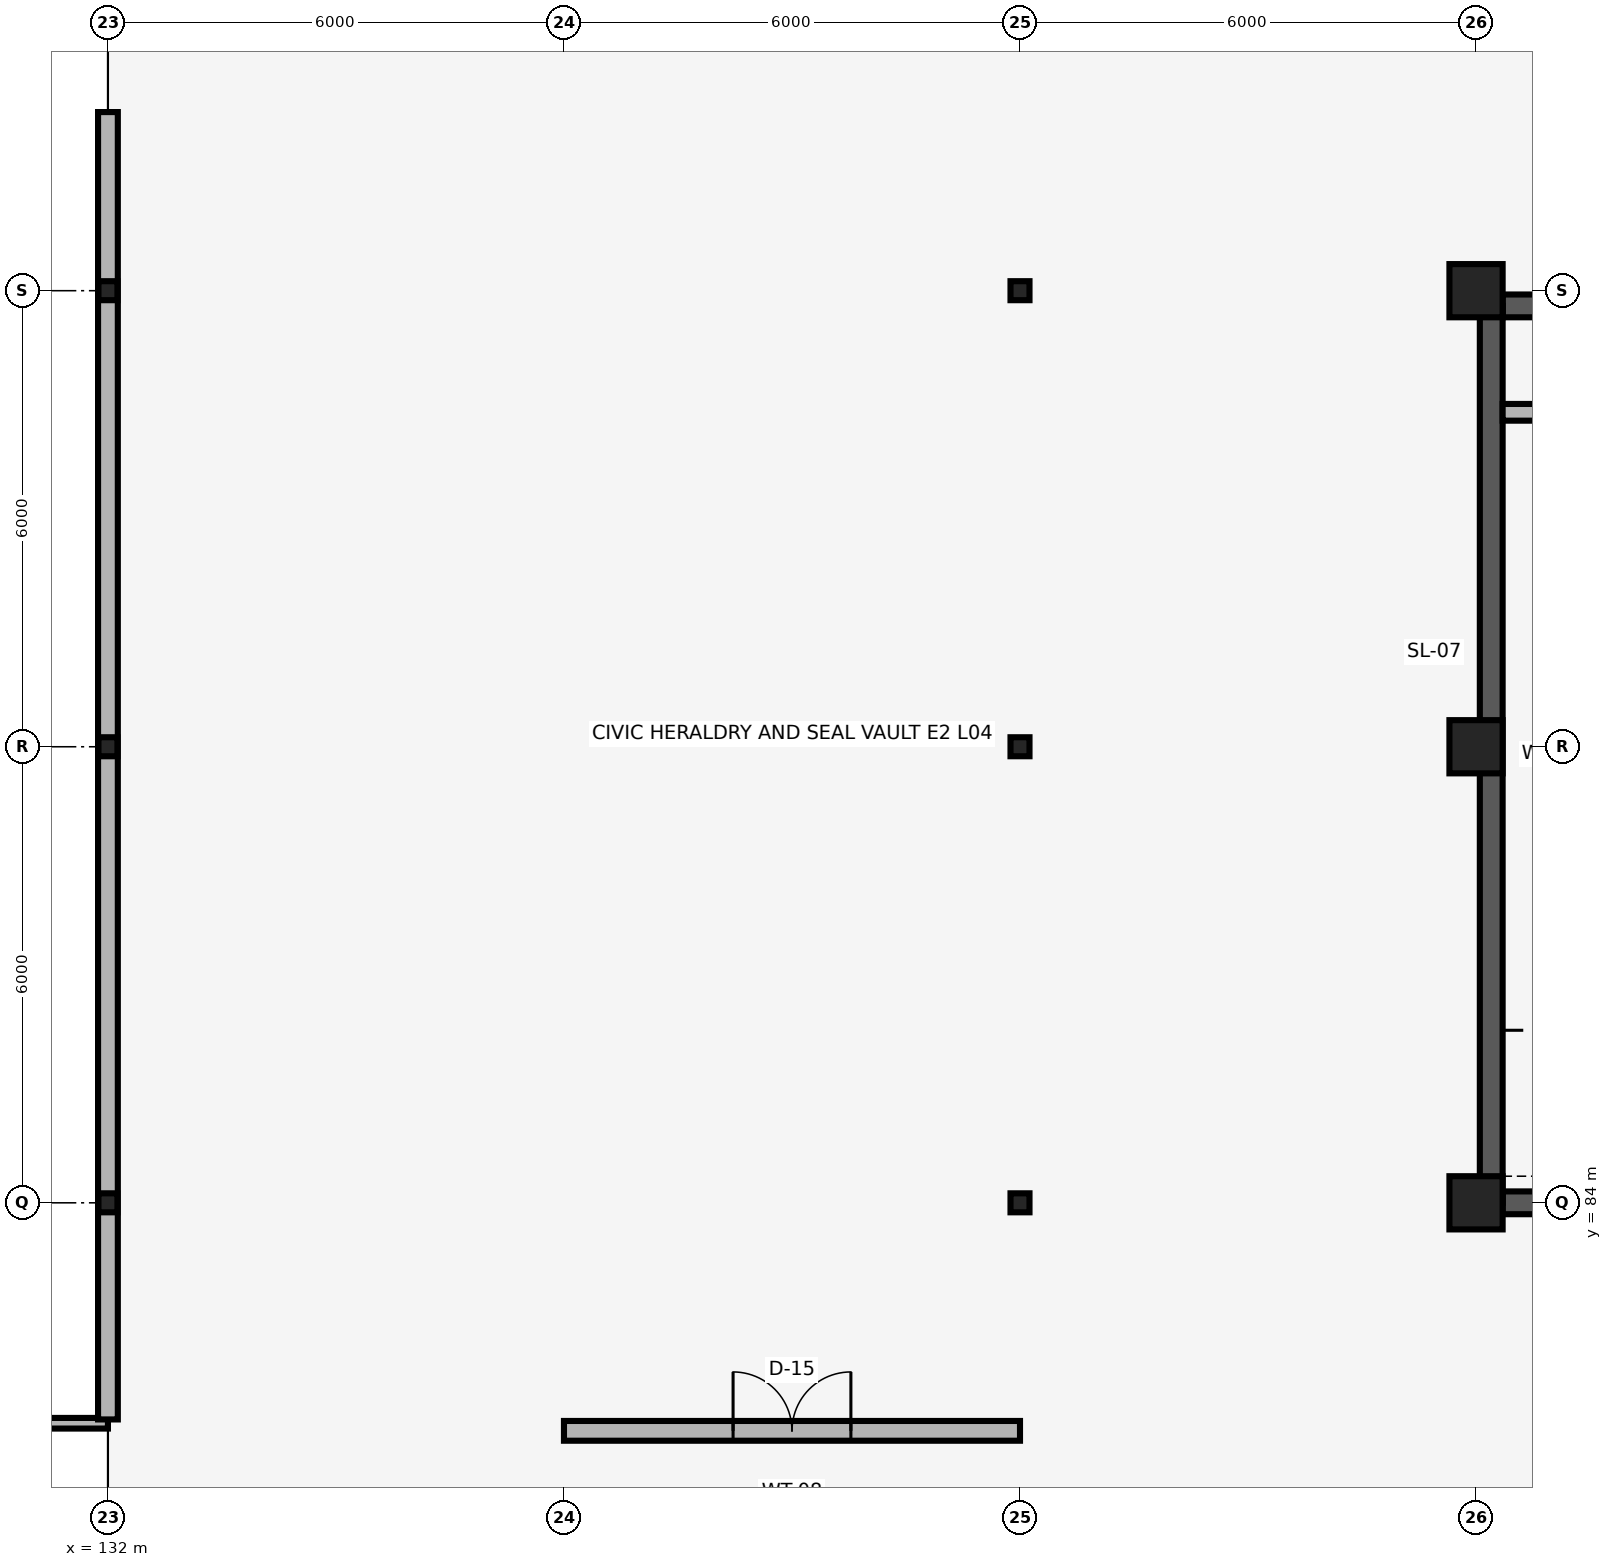
"""IFC4 building model, lengths in metres.
Left out: names, types, materials, properties, quantities, classifications, styles, units other than length and angle.
Written with IfcOpenShell. Run it as: python <this file> out.ifc"""

import sys

from ifc_helpers import new_model, si_unit, direction, frame, frame_2d, origin, origin_2d, place, context, subcontext, project, spatial, rectangle, i_section, extrude, element, fill, save


model = new_model("IFC4")
c1 = context("Model", 3, precision=1e-05, world=origin(), true_north=direction((0.0, 1.0)))
c2 = subcontext(c1, "Body", "Model", "MODEL_VIEW")
j1 = project(units=[si_unit("LENGTHUNIT", "METRE"), si_unit("PLANEANGLEUNIT", "RADIAN")], contexts=[c1])
p1 = place(None, origin())
s1 = spatial("IfcSite", under=j1, at=p1, CompositionType="ELEMENT")
p2 = place(p1, origin())
s2 = spatial("IfcBuilding", under=s1, at=p2, CompositionType="ELEMENT")
p3 = place(p2, frame((0.0, 0.0, 16.5)))
s3 = spatial("IfcBuildingStorey", under=s2, at=p3, CompositionType="ELEMENT", Elevation=16.5)
p4 = place(p3, frame((132.0, 84.0, 0.0), z_axis=(0.0, 0.0, 1.0), x_axis=(1.0, 0.0, 0.0)))
e1 = element("IfcColumn", 1, at=p4, inside=s3, PredefinedType="COLUMN", context=c2, shape_type="SweptSolid", body=[
    extrude(i_section(OverallWidth=0.25, OverallDepth=0.25, WebThickness=0.009, FlangeThickness=0.014, FilletRadius=0.016, at=origin_2d()), origin(), (0.0, 0.0, 1.0), 4.5),
])
p5 = place(p3, frame((144.0, 84.0, 0.0), z_axis=(0.0, 0.0, 1.0), x_axis=(1.0, 0.0, 0.0)))
e2 = element("IfcColumn", 2, at=p5, inside=s3, PredefinedType="COLUMN", context=c2, shape_type="SweptSolid", body=[
    extrude(i_section(OverallWidth=0.25, OverallDepth=0.25, WebThickness=0.009, FlangeThickness=0.014, FilletRadius=0.016, at=origin_2d()), origin(), (0.0, 0.0, 1.0), 4.0),
])
p6 = place(p3, frame((150.0, 84.0, 0.0), z_axis=(0.0, 0.0, 1.0), x_axis=(1.0, 0.0, 0.0)))
e3 = element("IfcColumn", 3, at=p6, inside=s3, PredefinedType="COLUMN", context=c2, shape_type="SweptSolid", body=[
    extrude(rectangle(XDim=0.7, YDim=0.7, at=origin_2d()), origin(), (0.0, 0.0, 1.0), 4.0),
])
p7 = place(p3, frame((132.0, 90.0, 0.0), z_axis=(0.0, 0.0, 1.0), x_axis=(1.0, 0.0, 0.0)))
e4 = element("IfcColumn", 4, at=p7, inside=s3, PredefinedType="COLUMN", context=c2, shape_type="SweptSolid", body=[
    extrude(i_section(OverallWidth=0.25, OverallDepth=0.25, WebThickness=0.009, FlangeThickness=0.014, FilletRadius=0.016, at=origin_2d()), origin(), (0.0, 0.0, 1.0), 4.5),
])
p8 = place(p3, frame((144.0, 90.0, 0.0), z_axis=(0.0, 0.0, 1.0), x_axis=(1.0, 0.0, 0.0)))
e5 = element("IfcColumn", 5, at=p8, inside=s3, PredefinedType="COLUMN", context=c2, shape_type="SweptSolid", body=[
    extrude(i_section(OverallWidth=0.25, OverallDepth=0.25, WebThickness=0.009, FlangeThickness=0.014, FilletRadius=0.016, at=origin_2d()), origin(), (0.0, 0.0, 1.0), 4.0),
])
p9 = place(p3, frame((150.0, 90.0, 0.0), z_axis=(0.0, 0.0, 1.0), x_axis=(1.0, 0.0, 0.0)))
e6 = element("IfcColumn", 6, at=p9, inside=s3, PredefinedType="COLUMN", context=c2, shape_type="SweptSolid", body=[
    extrude(rectangle(XDim=0.7, YDim=0.7, at=origin_2d()), origin(), (0.0, 0.0, 1.0), 4.0),
])
p10 = place(p3, frame((132.0, 96.0, 0.0), z_axis=(0.0, 0.0, 1.0), x_axis=(1.0, 0.0, 0.0)))
e7 = element("IfcColumn", 7, at=p10, inside=s3, PredefinedType="COLUMN", context=c2, shape_type="SweptSolid", body=[
    extrude(i_section(OverallWidth=0.25, OverallDepth=0.25, WebThickness=0.009, FlangeThickness=0.014, FilletRadius=0.016, at=origin_2d()), origin(), (0.0, 0.0, 1.0), 4.5),
])
p11 = place(p3, frame((144.0, 96.0, 0.0), z_axis=(0.0, 0.0, 1.0), x_axis=(1.0, 0.0, 0.0)))
e8 = element("IfcColumn", 8, at=p11, inside=s3, PredefinedType="COLUMN", context=c2, shape_type="SweptSolid", body=[
    extrude(i_section(OverallWidth=0.25, OverallDepth=0.25, WebThickness=0.009, FlangeThickness=0.014, FilletRadius=0.016, at=origin_2d()), origin(), (0.0, 0.0, 1.0), 4.0),
])
p12 = place(p3, frame((150.0, 96.0, 0.0), z_axis=(0.0, 0.0, 1.0), x_axis=(1.0, 0.0, 0.0)))
e9 = element("IfcColumn", 9, at=p12, inside=s3, PredefinedType="COLUMN", context=c2, shape_type="SweptSolid", body=[
    extrude(rectangle(XDim=0.7, YDim=0.7, at=origin_2d()), origin(), (0.0, 0.0, 1.0), 4.0),
])
p13 = place(p3, frame((150.35, 84.0, 0.0), z_axis=(0.0, 0.0, 1.0), x_axis=(1.0, 0.0, 0.0)))
e10 = element("IfcWall", 10, at=p13, inside=s3, PredefinedType="SHEAR", context=c2, shape_type="SweptSolid", body=[
    extrude(rectangle(XDim=5.3, YDim=0.3, at=frame_2d((2.65, 0.0))), origin(), (0.0, 0.0, 1.0), 4.0),
])
p14 = place(p13, frame((1.925, 0.0, 0.0)))
e11 = element("IfcOpeningElement", 11, at=p14, cuts=e10, PredefinedType="OPENING", context=c2, shape_type="SweptSolid", body=[
    extrude(rectangle(XDim=1.45, YDim=2.25, at=frame_2d((0.725, 1.125))), frame((0.0, 0.165, 0.0), z_axis=(0.0, -1.0, 0.0), x_axis=(1.0, 0.0, 0.0)), (0.0, 0.0, 1.0), 0.33),
])
p15 = place(p3, frame((150.35, 95.8, 0.0), z_axis=(0.0, 0.0, 1.0), x_axis=(1.0, 0.0, 0.0)))
e12 = element("IfcWall", 12, at=p15, inside=s3, PredefinedType="SHEAR", context=c2, shape_type="SweptSolid", body=[
    extrude(rectangle(XDim=5.3, YDim=0.3, at=frame_2d((2.65, 0.0))), origin(), (0.0, 0.0, 1.0), 4.0),
])
p16 = place(p3, frame((150.2, 84.0, 0.0), z_axis=(0.0, 0.0, 1.0), x_axis=(0.0, 1.0, 0.0)))
e13 = element("IfcWall", 13, at=p16, inside=s3, PredefinedType="SHEAR", context=c2, shape_type="SweptSolid", body=[
    extrude(rectangle(XDim=11.8, YDim=0.3, at=frame_2d((5.9, 0.0))), origin(), (0.0, 0.0, 1.0), 4.0),
])
p17 = place(p3, frame((150.35, 94.4, 0.0), z_axis=(0.0, 0.0, 1.0), x_axis=(1.0, 0.0, 0.0)))
e14 = element("IfcWall", 14, at=p17, inside=s3, PredefinedType="PARTITIONING", context=c2, shape_type="SweptSolid", body=[
    extrude(rectangle(XDim=1.1, YDim=0.22, at=frame_2d((0.55, 0.0))), origin(), (0.0, 0.0, 1.0), 4.0),
])
p18 = place(p3, frame((120.0, 81.1, 0.0), z_axis=(0.0, 0.0, 1.0), x_axis=(1.0, 0.0, 0.0)))
e15 = element("IfcWall", 15, at=p18, inside=s3, PredefinedType="PARTITIONING", context=c2, shape_type="SweptSolid", body=[
    extrude(rectangle(XDim=12.0, YDim=0.14, at=frame_2d((6.0, 0.0))), origin(), (0.0, 0.0, 1.0), 4.0),
])
p19 = place(p18, frame((4.95, 0.0, 0.0)))
e16 = element("IfcOpeningElement", 16, at=p19, cuts=e15, PredefinedType="OPENING", context=c2, shape_type="SweptSolid", body=[
    extrude(rectangle(XDim=2.1, YDim=2.9, at=frame_2d((1.05, 1.45))), frame((0.0, 0.085, 0.0), z_axis=(0.0, -1.0, 0.0), x_axis=(1.0, 0.0, 0.0)), (0.0, 0.0, 1.0), 0.17),
])
p20 = place(p3, frame((138.0, 81.0, 0.0), z_axis=(0.0, 0.0, 1.0), x_axis=(1.0, 0.0, 0.0)))
e17 = element("IfcWall", 17, at=p20, inside=s3, PredefinedType="PARTITIONING", context=c2, shape_type="SweptSolid", body=[
    extrude(rectangle(XDim=6.0, YDim=0.26, at=frame_2d((3.0, 0.0))), origin(), (0.0, 0.0, 1.0), 4.0),
])
p21 = place(p20, frame((2.225, 0.0, 0.0)))
e18 = element("IfcOpeningElement", 18, at=p21, cuts=e17, PredefinedType="OPENING", context=c2, shape_type="SweptSolid", body=[
    extrude(rectangle(XDim=1.55, YDim=2.3, at=frame_2d((0.775, 1.15))), frame((0.0, 0.145, 0.0), z_axis=(0.0, -1.0, 0.0), x_axis=(1.0, 0.0, 0.0)), (0.0, 0.0, 1.0), 0.29),
])
p22 = place(p3, frame((132.0, 81.15, 0.0), z_axis=(0.0, 0.0, 1.0), x_axis=(0.0, 1.0, 0.0)))
e19 = element("IfcWall", 19, at=p22, inside=s3, PredefinedType="PARTITIONING", context=c2, shape_type="SweptSolid", body=[
    extrude(rectangle(XDim=17.2, YDim=0.26, at=frame_2d((8.6, 0.0))), origin(), (0.0, 0.0, 1.0), 3.56),
])
p23 = place(p21, origin())
e20 = element("IfcDoor", 20, at=p23, inside=s3, OperationType="DOUBLE_DOOR_SINGLE_SWING", PredefinedType="DOOR", context=c2, shape_type="SweptSolid", body=[
    extrude(rectangle(XDim=1.55, YDim=2.3, at=frame_2d((0.775, 1.15))), frame((0.0, 0.025, 0.0), z_axis=(0.0, -1.0, 0.0), x_axis=(1.0, 0.0, 0.0)), (0.0, 0.0, 1.0), 0.05),
])
fill(e18, e20)
save(model, sys.argv[1])
